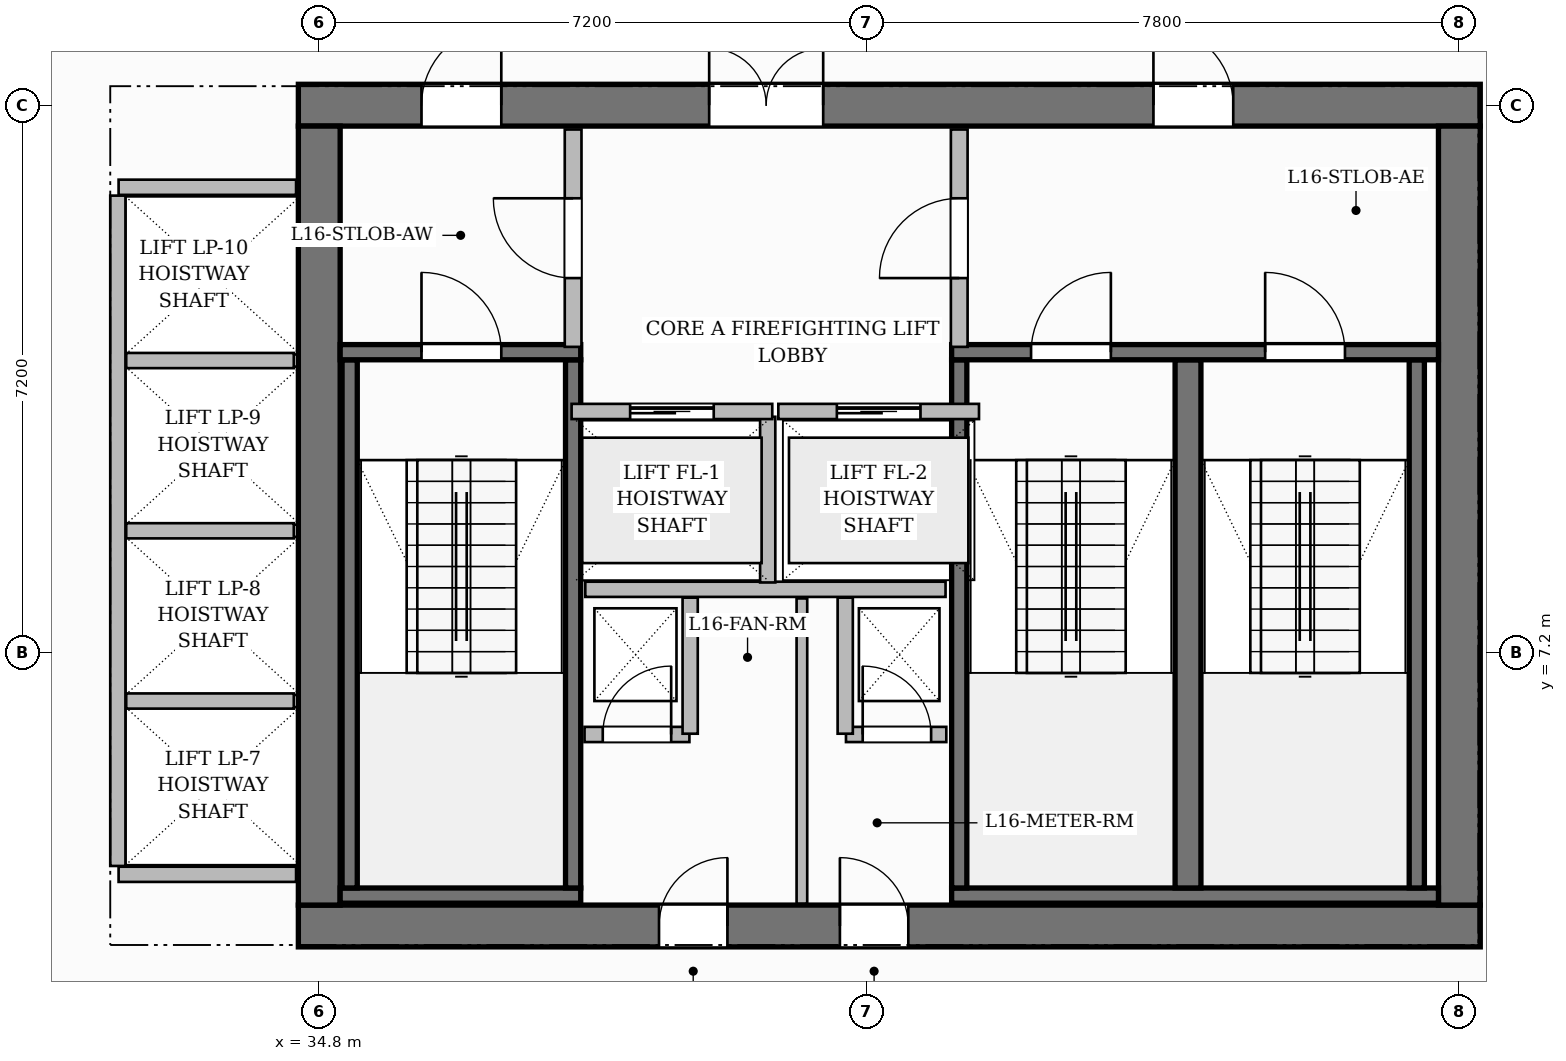
"""IFC4 building model, lengths in metres.
Left out: names, types, materials, properties, quantities, classifications, styles, units other than length and angle.
Written with IfcOpenShell. Run it as: python <this file> out.ifc"""

import sys

from ifc_helpers import new_model, si_unit, direction, frame, frame_2d, origin, place, context, subcontext, project, spatial, rectangle, extrude, source, transform, mapped, element, fill, save


model = new_model("IFC4")
c1 = context("Model", 3, precision=1e-05, world=origin(), true_north=direction((0.0, 1.0)))
c2 = subcontext(c1, "Body", "Model", "MODEL_VIEW")
j1 = project(units=[si_unit("LENGTHUNIT", "METRE"), si_unit("PLANEANGLEUNIT", "RADIAN")], contexts=[c1])
p1 = place(None, origin())
s1 = spatial("IfcSite", under=j1, at=p1, CompositionType="ELEMENT")
p2 = place(p1, origin())
s2 = spatial("IfcBuilding", under=s1, at=p2, CompositionType="ELEMENT")
p3 = place(p2, frame((0.0, 0.0, 69.4)))
s3 = spatial("IfcBuildingStorey", under=s2, at=p3, CompositionType="ELEMENT", Elevation=69.4)
p4 = place(p3, frame((34.525, 3.6, 0.0), z_axis=(0.0, 0.0, 1.0), x_axis=(1.0, 0.0, 0.0)))
e1 = element("IfcWall", 1, at=p4, inside=s3, PredefinedType="SHEAR", context=c2, shape_type="SweptSolid", body=[
    extrude(rectangle(XDim=15.55, YDim=0.55, at=frame_2d((7.775, 0.0))), origin(), (0.0, 0.0, 1.0), 3.7),
])
p5 = place(p4, frame((4.745, 0.0, 0.0)))
e2 = element("IfcOpeningElement", 2, at=p5, cuts=e1, PredefinedType="OPENING", context=c2, shape_type="SweptSolid", body=[
    extrude(rectangle(XDim=0.9, YDim=2.1, at=frame_2d((0.45, 1.05))), frame((0.0, 0.285, 0.0), z_axis=(0.0, -1.0, 0.0), x_axis=(1.0, 0.0, 0.0)), (0.0, 0.0, 1.0), 0.57),
])
p6 = place(p4, frame((7.125, 0.0, 0.0)))
e3 = element("IfcOpeningElement", 3, at=p6, cuts=e1, PredefinedType="OPENING", context=c2, shape_type="SweptSolid", body=[
    extrude(rectangle(XDim=0.9, YDim=2.1, at=frame_2d((0.45, 1.05))), frame((0.0, 0.285, 0.0), z_axis=(0.0, -1.0, 0.0), x_axis=(1.0, 0.0, 0.0)), (0.0, 0.0, 1.0), 0.57),
])
p7 = place(p3, frame((34.525, 14.4, 0.0), z_axis=(0.0, 0.0, 1.0), x_axis=(1.0, 0.0, 0.0)))
e4 = element("IfcWall", 4, at=p7, inside=s3, PredefinedType="SHEAR", context=c2, shape_type="SweptSolid", body=[
    extrude(rectangle(XDim=15.55, YDim=0.55, at=frame_2d((7.775, 0.0))), origin(), (0.0, 0.0, 1.0), 3.7),
])
p8 = place(p7, frame((5.405, 0.0, 0.0)))
e5 = element("IfcOpeningElement", 5, at=p8, cuts=e4, PredefinedType="OPENING", context=c2, shape_type="SweptSolid", body=[
    extrude(rectangle(XDim=1.5, YDim=2.2, at=frame_2d((0.75, 1.1))), frame((0.0, 0.285, 0.0), z_axis=(0.0, -1.0, 0.0), x_axis=(1.0, 0.0, 0.0)), (0.0, 0.0, 1.0), 0.57),
])
p9 = place(p7, frame((1.62, 0.0, 0.0)))
e6 = element("IfcOpeningElement", 6, at=p9, cuts=e4, PredefinedType="OPENING", context=c2, shape_type="SweptSolid", body=[
    extrude(rectangle(XDim=1.05, YDim=2.15, at=frame_2d((0.525, 1.075))), frame((0.0, 0.285, 0.0), z_axis=(0.0, -1.0, 0.0), x_axis=(1.0, 0.0, 0.0)), (0.0, 0.0, 1.0), 0.57),
])
p10 = place(p7, frame((11.25, 0.0, 0.0)))
e7 = element("IfcOpeningElement", 7, at=p10, cuts=e4, PredefinedType="OPENING", context=c2, shape_type="SweptSolid", body=[
    extrude(rectangle(XDim=1.05, YDim=2.15, at=frame_2d((0.525, 1.075))), frame((0.0, 0.285, 0.0), z_axis=(0.0, -1.0, 0.0), x_axis=(1.0, 0.0, 0.0)), (0.0, 0.0, 1.0), 0.57),
])
for number, where, z_axis, x_axis in (
    (8, (34.8, 3.875, 0.0), (0.0, 0.0, 1.0), (0.0, 1.0, 0.0)),
    (9, (49.8, 3.875, 0.0), (0.0, 0.0, 1.0), (0.0, 1.0, 0.0)),
):
    element("IfcWall", number, at=place(p3, frame(where, z_axis=z_axis, x_axis=x_axis)), inside=s3, PredefinedType="SHEAR", context=c2, shape_type="SweptSolid", body=[
        extrude(rectangle(XDim=10.25, YDim=0.55, at=frame_2d((5.125, 0.0))), origin(), (0.0, 0.0, 1.0), 3.7),
    ])
p11 = place(p3, frame((35.075, 4.0, 0.0), z_axis=(0.0, 0.0, 1.0), x_axis=(1.0, 0.0, 0.0)))
e10 = element("IfcWall", 10, at=p11, inside=s3, PredefinedType="SHEAR", context=c2, shape_type="SweptSolid", body=[
    extrude(rectangle(XDim=3.165, YDim=0.2, at=frame_2d((1.583, 0.0))), origin(), (0.0, 0.0, 1.0), 3.7),
])
for number, where, z_axis, x_axis in (
    (11, (35.2, 4.1, 0.0), (0.0, 0.0, 1.0), (0.0, 1.0, 0.0)),
    (12, (38.14, 4.1, 0.0), (0.0, 0.0, 1.0), (0.0, 1.0, 0.0)),
):
    element("IfcWall", number, at=place(p3, frame(where, z_axis=z_axis, x_axis=x_axis)), inside=s3, PredefinedType="SHEAR", context=c2, shape_type="SweptSolid", body=[
        extrude(rectangle(XDim=6.95, YDim=0.2, at=frame_2d((3.475, 0.0))), origin(), (0.0, 0.0, 1.0), 3.7),
    ])
p12 = place(p3, frame((35.075, 11.15, 0.0), z_axis=(0.0, 0.0, 1.0), x_axis=(1.0, 0.0, 0.0)))
e13 = element("IfcWall", 13, at=p12, inside=s3, PredefinedType="SHEAR", context=c2, shape_type="SweptSolid", body=[
    extrude(rectangle(XDim=3.165, YDim=0.2, at=frame_2d((1.583, 0.0))), origin(), (0.0, 0.0, 1.0), 3.7),
])
p13 = place(p12, frame((1.07, 0.0, 0.0)))
e14 = element("IfcOpeningElement", 14, at=p13, cuts=e13, PredefinedType="OPENING", context=c2, shape_type="SweptSolid", body=[
    extrude(rectangle(XDim=1.05, YDim=2.2, at=frame_2d((0.525, 1.1))), frame((0.0, 0.11, 0.0), z_axis=(0.0, -1.0, 0.0), x_axis=(1.0, 0.0, 0.0)), (0.0, 0.0, 1.0), 0.22),
])
p14 = place(p3, frame((43.12, 4.0, 0.0), z_axis=(0.0, 0.0, 1.0), x_axis=(1.0, 0.0, 0.0)))
e15 = element("IfcWall", 15, at=p14, inside=s3, PredefinedType="SHEAR", context=c2, shape_type="SweptSolid", body=[
    extrude(rectangle(XDim=6.405, YDim=0.2, at=frame_2d((3.202, 0.0))), origin(), (0.0, 0.0, 1.0), 3.7),
])
p15 = place(p3, frame((43.22, 4.1, 0.0), z_axis=(0.0, 0.0, 1.0), x_axis=(0.0, 1.0, 0.0)))
e16 = element("IfcWall", 16, at=p15, inside=s3, PredefinedType="SHEAR", context=c2, shape_type="SweptSolid", body=[
    extrude(rectangle(XDim=6.95, YDim=0.2, at=frame_2d((3.475, 0.0))), origin(), (0.0, 0.0, 1.0), 3.7),
])
p16 = place(p3, frame((46.23, 4.1, 0.0), z_axis=(0.0, 0.0, 1.0), x_axis=(0.0, 1.0, 0.0)))
e17 = element("IfcWall", 17, at=p16, inside=s3, PredefinedType="SHEAR", context=c2, shape_type="SweptSolid", body=[
    extrude(rectangle(XDim=6.95, YDim=0.34, at=frame_2d((3.475, 0.0))), origin(), (0.0, 0.0, 1.0), 3.7),
])
p17 = place(p3, frame((49.24, 4.1, 0.0), z_axis=(0.0, 0.0, 1.0), x_axis=(0.0, 1.0, 0.0)))
e18 = element("IfcWall", 18, at=p17, inside=s3, PredefinedType="SHEAR", context=c2, shape_type="SweptSolid", body=[
    extrude(rectangle(XDim=6.95, YDim=0.2, at=frame_2d((3.475, 0.0))), origin(), (0.0, 0.0, 1.0), 3.7),
])
p18 = place(p3, frame((43.12, 11.15, 0.0), z_axis=(0.0, 0.0, 1.0), x_axis=(1.0, 0.0, 0.0)))
e19 = element("IfcWall", 19, at=p18, inside=s3, PredefinedType="SHEAR", context=c2, shape_type="SweptSolid", body=[
    extrude(rectangle(XDim=6.405, YDim=0.2, at=frame_2d((3.202, 0.0))), origin(), (0.0, 0.0, 1.0), 3.7),
])
p19 = place(p18, frame((1.045, 0.0, 0.0)))
e20 = element("IfcOpeningElement", 20, at=p19, cuts=e19, PredefinedType="OPENING", context=c2, shape_type="SweptSolid", body=[
    extrude(rectangle(XDim=1.05, YDim=2.2, at=frame_2d((0.525, 1.1))), frame((0.0, 0.11, 0.0), z_axis=(0.0, -1.0, 0.0), x_axis=(1.0, 0.0, 0.0)), (0.0, 0.0, 1.0), 0.22),
])
p20 = place(p18, frame((4.125, 0.0, 0.0)))
e21 = element("IfcOpeningElement", 21, at=p20, cuts=e19, PredefinedType="OPENING", context=c2, shape_type="SweptSolid", body=[
    extrude(rectangle(XDim=1.05, YDim=2.2, at=frame_2d((0.525, 1.1))), frame((0.0, 0.11, 0.0), z_axis=(0.0, -1.0, 0.0), x_axis=(1.0, 0.0, 0.0)), (0.0, 0.0, 1.0), 0.22),
])
p21 = place(p3, frame((38.3, 8.03, 0.0), z_axis=(0.0, 0.0, 1.0), x_axis=(1.0, 0.0, 0.0)))
e22 = element("IfcWall", 22, at=p21, inside=s3, PredefinedType="PARTITIONING", context=c2, shape_type="SweptSolid", body=[
    extrude(rectangle(XDim=4.74, YDim=0.2, at=frame_2d((2.37, 0.0))), origin(), (0.0, 0.0, 1.0), 3.45),
])
p22 = place(p3, frame((40.7, 8.12, 0.0), z_axis=(0.0, 0.0, 1.0), x_axis=(0.0, 1.0, 0.0)))
e23 = element("IfcWall", 23, at=p22, inside=s3, PredefinedType="PARTITIONING", context=c2, shape_type="SweptSolid", body=[
    extrude(rectangle(XDim=2.18, YDim=0.2, at=frame_2d((1.09, 0.0))), origin(), (0.0, 0.0, 1.0), 3.45),
])
p23 = place(p3, frame((38.14, 11.22, 0.0), z_axis=(0.0, 0.0, 1.0), x_axis=(0.0, 1.0, 0.0)))
e24 = element("IfcWall", 24, at=p23, inside=s3, PredefinedType="PARTITIONING", context=c2, shape_type="SweptSolid", body=[
    extrude(rectangle(XDim=2.86, YDim=0.22, at=frame_2d((1.43, 0.0))), origin(), (0.0, 0.0, 1.0), 3.45),
])
p24 = place(p23, frame((0.905, 0.0, 0.0)))
e25 = element("IfcOpeningElement", 25, at=p24, cuts=e24, PredefinedType="OPENING", context=c2, shape_type="SweptSolid", body=[
    extrude(rectangle(XDim=1.05, YDim=2.15, at=frame_2d((0.525, 1.075))), frame((0.0, 0.12, 0.0), z_axis=(0.0, -1.0, 0.0), x_axis=(1.0, 0.0, 0.0)), (0.0, 0.0, 1.0), 0.24),
])
p25 = place(p3, frame((43.22, 11.22, 0.0), z_axis=(0.0, 0.0, 1.0), x_axis=(0.0, 1.0, 0.0)))
e26 = element("IfcWall", 26, at=p25, inside=s3, PredefinedType="PARTITIONING", context=c2, shape_type="SweptSolid", body=[
    extrude(rectangle(XDim=2.86, YDim=0.22, at=frame_2d((1.43, 0.0))), origin(), (0.0, 0.0, 1.0), 3.45),
])
p26 = place(p25, frame((0.905, 0.0, 0.0)))
e27 = element("IfcOpeningElement", 27, at=p26, cuts=e26, PredefinedType="OPENING", context=c2, shape_type="SweptSolid", body=[
    extrude(rectangle(XDim=1.05, YDim=2.15, at=frame_2d((0.525, 1.075))), frame((0.0, 0.12, 0.0), z_axis=(0.0, -1.0, 0.0), x_axis=(1.0, 0.0, 0.0)), (0.0, 0.0, 1.0), 0.24),
])
p27 = place(p3, frame((38.29, 6.12, 0.0), z_axis=(0.0, 0.0, 1.0), x_axis=(1.0, 0.0, 0.0)))
e28 = element("IfcWall", 28, at=p27, inside=s3, PredefinedType="PARTITIONING", context=c2, shape_type="SweptSolid", body=[
    extrude(rectangle(XDim=1.38, YDim=0.2, at=frame_2d((0.69, 0.0))), origin(), (0.0, 0.0, 1.0), 3.45),
])
p28 = place(p27, frame((0.24, 0.0, 0.0)))
e29 = element("IfcOpeningElement", 29, at=p28, cuts=e28, PredefinedType="OPENING", context=c2, shape_type="SweptSolid", body=[
    extrude(rectangle(XDim=0.9, YDim=2.1, at=frame_2d((0.45, 1.05))), frame((0.0, 0.11, 0.0), z_axis=(0.0, -1.0, 0.0), x_axis=(1.0, 0.0, 0.0)), (0.0, 0.0, 1.0), 0.22),
])
p29 = place(p3, frame((39.68, 6.13, 0.0), z_axis=(0.0, 0.0, 1.0), x_axis=(0.0, 1.0, 0.0)))
e30 = element("IfcWall", 30, at=p29, inside=s3, PredefinedType="PARTITIONING", context=c2, shape_type="SweptSolid", body=[
    extrude(rectangle(XDim=1.79, YDim=0.2, at=frame_2d((0.895, 0.0))), origin(), (0.0, 0.0, 1.0), 3.45),
])
p30 = place(p3, frame((41.73, 6.12, 0.0), z_axis=(0.0, 0.0, 1.0), x_axis=(1.0, 0.0, 0.0)))
e31 = element("IfcWall", 31, at=p30, inside=s3, PredefinedType="PARTITIONING", context=c2, shape_type="SweptSolid", body=[
    extrude(rectangle(XDim=1.32, YDim=0.2, at=frame_2d((0.66, 0.0))), origin(), (0.0, 0.0, 1.0), 3.45),
])
p31 = place(p30, frame((0.22, 0.0, 0.0)))
e32 = element("IfcOpeningElement", 32, at=p31, cuts=e31, PredefinedType="OPENING", context=c2, shape_type="SweptSolid", body=[
    extrude(rectangle(XDim=0.9, YDim=2.1, at=frame_2d((0.45, 1.05))), frame((0.0, 0.11, 0.0), z_axis=(0.0, -1.0, 0.0), x_axis=(1.0, 0.0, 0.0)), (0.0, 0.0, 1.0), 0.22),
])
p32 = place(p3, frame((41.72, 6.13, 0.0), z_axis=(0.0, 0.0, 1.0), x_axis=(0.0, 1.0, 0.0)))
e33 = element("IfcWall", 33, at=p32, inside=s3, PredefinedType="PARTITIONING", context=c2, shape_type="SweptSolid", body=[
    extrude(rectangle(XDim=1.79, YDim=0.2, at=frame_2d((0.895, 0.0))), origin(), (0.0, 0.0, 1.0), 3.45),
])
p33 = place(p3, frame((41.15, 3.895, 0.0), z_axis=(0.0, 0.0, 1.0), x_axis=(0.0, 1.0, 0.0)))
e34 = element("IfcWall", 34, at=p33, inside=s3, PredefinedType="PARTITIONING", context=c2, shape_type="SweptSolid", body=[
    extrude(rectangle(XDim=4.015, YDim=0.14, at=frame_2d((2.007, 0.0))), origin(), (0.0, 0.0, 1.0), 3.45),
])
for number, where, z_axis, x_axis in (
    (35, (32.16, 4.28, 0.0), (0.0, 0.0, 1.0), (1.0, 0.0, 0.0)),
    (36, (32.16, 13.32, 0.0), (0.0, 0.0, 1.0), (1.0, 0.0, 0.0)),
):
    element("IfcWall", number, at=place(p3, frame(where, z_axis=z_axis, x_axis=x_axis)), inside=s3, PredefinedType="PARTITIONING", context=c2, shape_type="SweptSolid", body=[
        extrude(rectangle(XDim=2.335, YDim=0.2, at=frame_2d((1.167, 0.0))), origin(), (0.0, 0.0, 1.0), 3.45),
    ])
p34 = place(p3, frame((32.15, 4.39, 0.0), z_axis=(0.0, 0.0, 1.0), x_axis=(0.0, 1.0, 0.0)))
e37 = element("IfcWall", 37, at=p34, inside=s3, PredefinedType="PARTITIONING", context=c2, shape_type="SweptSolid", body=[
    extrude(rectangle(XDim=8.82, YDim=0.2, at=frame_2d((4.41, 0.0))), origin(), (0.0, 0.0, 1.0), 3.45),
])
for number, where, z_axis, x_axis in (
    (38, (32.26, 6.56, 0.0), (0.0, 0.0, 1.0), (1.0, 0.0, 0.0)),
    (39, (32.26, 8.8, 0.0), (0.0, 0.0, 1.0), (1.0, 0.0, 0.0)),
    (40, (32.26, 11.04, 0.0), (0.0, 0.0, 1.0), (1.0, 0.0, 0.0)),
):
    element("IfcWall", number, at=place(p3, frame(where, z_axis=z_axis, x_axis=x_axis)), inside=s3, PredefinedType="PARTITIONING", context=c2, shape_type="SweptSolid", body=[
        extrude(rectangle(XDim=2.205, YDim=0.2, at=frame_2d((1.103, 0.0))), origin(), (0.0, 0.0, 1.0), 3.45),
    ])
p35 = place(p3, frame((38.12, 10.37, 0.0), z_axis=(0.0, 0.0, 1.0), x_axis=(1.0, 0.0, 0.0)))
e41 = element("IfcWall", 41, at=p35, inside=s3, PredefinedType="PARTITIONING", context=c2, shape_type="SweptSolid", body=[
    extrude(rectangle(XDim=2.64, YDim=0.2, at=frame_2d((1.32, 0.0))), origin(), (0.0, 0.0, 1.0), 3.45),
])
p36 = place(p35, frame((0.77, 0.0, 0.0)))
e42 = element("IfcOpeningElement", 42, at=p36, cuts=e41, PredefinedType="OPENING", context=c2, shape_type="SweptSolid", body=[
    extrude(rectangle(XDim=1.1, YDim=2.2, at=frame_2d((0.55, 1.1))), frame((0.0, 0.11, 0.0), z_axis=(0.0, -1.0, 0.0), x_axis=(1.0, 0.0, 0.0)), (0.0, 0.0, 1.0), 0.22),
])
p37 = place(p3, frame((40.84, 10.37, 0.0), z_axis=(0.0, 0.0, 1.0), x_axis=(1.0, 0.0, 0.0)))
e43 = element("IfcWall", 43, at=p37, inside=s3, PredefinedType="PARTITIONING", context=c2, shape_type="SweptSolid", body=[
    extrude(rectangle(XDim=2.64, YDim=0.2, at=frame_2d((1.32, 0.0))), origin(), (0.0, 0.0, 1.0), 3.45),
])
p38 = place(p37, frame((0.77, 0.0, 0.0)))
e44 = element("IfcOpeningElement", 44, at=p38, cuts=e43, PredefinedType="OPENING", context=c2, shape_type="SweptSolid", body=[
    extrude(rectangle(XDim=1.1, YDim=2.2, at=frame_2d((0.55, 1.1))), frame((0.0, 0.11, 0.0), z_axis=(0.0, -1.0, 0.0), x_axis=(1.0, 0.0, 0.0)), (0.0, 0.0, 1.0), 0.22),
])
m1 = source(origin(), c2, "Body", "SweptSolid", [
    extrude(rectangle(XDim=1.05, YDim=2.2, at=frame_2d((0.525, 1.1))), frame((0.0, 0.025, 0.0), z_axis=(0.0, -1.0, 0.0), x_axis=(1.0, 0.0, 0.0)), (0.0, 0.0, 1.0), 0.05),
])
p39 = place(p13, origin())
e45 = element("IfcDoor", 45, at=p39, inside=s3, OperationType="SINGLE_SWING_LEFT", PredefinedType="DOOR", context=c2, shape_type="MappedRepresentation", body=[
    mapped(m1, transform((0.0, 0.0, 0.0), scale=1.0)),
])
fill(e14, e45)
p40 = place(p19, origin())
e46 = element("IfcDoor", 46, at=p40, inside=s3, OperationType="SINGLE_SWING_RIGHT", PredefinedType="DOOR", context=c2, shape_type="MappedRepresentation", body=[
    mapped(m1, transform((0.0, 0.0, 0.0), scale=1.0)),
])
fill(e20, e46)
p41 = place(p20, origin())
e47 = element("IfcDoor", 47, at=p41, inside=s3, OperationType="SINGLE_SWING_LEFT", PredefinedType="DOOR", context=c2, shape_type="MappedRepresentation", body=[
    mapped(m1, transform((0.0, 0.0, 0.0), scale=1.0)),
])
fill(e21, e47)
m2 = source(origin(), c2, "Body", "SweptSolid", [
    extrude(rectangle(XDim=1.05, YDim=2.15, at=frame_2d((0.525, 1.075))), frame((0.0, 0.025, 0.0), z_axis=(0.0, -1.0, 0.0), x_axis=(1.0, 0.0, 0.0)), (0.0, 0.0, 1.0), 0.05),
])
p42 = place(p24, origin())
e48 = element("IfcDoor", 48, at=p42, inside=s3, OperationType="SINGLE_SWING_RIGHT", PredefinedType="DOOR", context=c2, shape_type="MappedRepresentation", body=[
    mapped(m2, transform((0.0, 0.0, 0.0), scale=1.0)),
])
fill(e25, e48)
p43 = place(p26, origin())
e49 = element("IfcDoor", 49, at=p43, inside=s3, OperationType="SINGLE_SWING_LEFT", PredefinedType="DOOR", context=c2, shape_type="MappedRepresentation", body=[
    mapped(m2, transform((0.0, 0.0, 0.0), scale=1.0)),
])
fill(e27, e49)
m3 = source(origin(), c2, "Body", "SweptSolid", [
    extrude(rectangle(XDim=1.5, YDim=2.2, at=frame_2d((0.75, 1.1))), frame((0.0, 0.025, 0.0), z_axis=(0.0, -1.0, 0.0), x_axis=(1.0, 0.0, 0.0)), (0.0, 0.0, 1.0), 0.05),
])
p44 = place(p8, origin())
e50 = element("IfcDoor", 50, at=p44, inside=s3, OperationType="DOUBLE_DOOR_SINGLE_SWING", PredefinedType="DOOR", context=c2, shape_type="MappedRepresentation", body=[
    mapped(m3, transform((0.0, 0.0, 0.0), scale=1.0)),
])
fill(e5, e50)
p45 = place(p9, origin())
e51 = element("IfcDoor", 51, at=p45, inside=s3, OperationType="SINGLE_SWING_RIGHT", PredefinedType="DOOR", context=c2, shape_type="MappedRepresentation", body=[
    mapped(m2, transform((0.0, 0.0, 0.0), scale=1.0)),
])
fill(e6, e51)
p46 = place(p10, origin())
e52 = element("IfcDoor", 52, at=p46, inside=s3, OperationType="SINGLE_SWING_LEFT", PredefinedType="DOOR", context=c2, shape_type="MappedRepresentation", body=[
    mapped(m2, transform((0.0, 0.0, 0.0), scale=1.0)),
])
fill(e7, e52)
m4 = source(origin(), c2, "Body", "SweptSolid", [
    extrude(rectangle(XDim=0.9, YDim=2.1, at=frame_2d((0.45, 1.05))), frame((0.0, 0.025, 0.0), z_axis=(0.0, -1.0, 0.0), x_axis=(1.0, 0.0, 0.0)), (0.0, 0.0, 1.0), 0.05),
])
p47 = place(p28, origin())
e53 = element("IfcDoor", 53, at=p47, inside=s3, OperationType="SINGLE_SWING_RIGHT", PredefinedType="DOOR", context=c2, shape_type="MappedRepresentation", body=[
    mapped(m4, transform((0.0, 0.0, 0.0), scale=1.0)),
])
fill(e29, e53)
p48 = place(p31, origin())
e54 = element("IfcDoor", 54, at=p48, inside=s3, OperationType="SINGLE_SWING_LEFT", PredefinedType="DOOR", context=c2, shape_type="MappedRepresentation", body=[
    mapped(m4, transform((0.0, 0.0, 0.0), scale=1.0)),
])
fill(e32, e54)
p49 = place(p5, origin())
e55 = element("IfcDoor", 55, at=p49, inside=s3, OperationType="SINGLE_SWING_RIGHT", PredefinedType="DOOR", context=c2, shape_type="MappedRepresentation", body=[
    mapped(m4, transform((0.0, 0.0, 0.0), scale=1.0)),
])
fill(e2, e55)
p50 = place(p6, origin())
e56 = element("IfcDoor", 56, at=p50, inside=s3, OperationType="SINGLE_SWING_LEFT", PredefinedType="DOOR", context=c2, shape_type="MappedRepresentation", body=[
    mapped(m4, transform((0.0, 0.0, 0.0), scale=1.0)),
])
fill(e3, e56)
m5 = source(origin(), c2, "Body", "SweptSolid", [
    extrude(rectangle(XDim=1.1, YDim=2.2, at=frame_2d((0.55, 1.1))), frame((0.0, 0.025, 0.0), z_axis=(0.0, -1.0, 0.0), x_axis=(1.0, 0.0, 0.0)), (0.0, 0.0, 1.0), 0.05),
])
p51 = place(p36, origin())
e57 = element("IfcDoor", 57, at=p51, inside=s3, OperationType="SLIDING_TO_LEFT", PredefinedType="DOOR", context=c2, shape_type="MappedRepresentation", body=[
    mapped(m5, transform((0.0, 0.0, 0.0), scale=1.0)),
])
fill(e42, e57)
p52 = place(p38, origin())
e58 = element("IfcDoor", 58, at=p52, inside=s3, OperationType="SLIDING_TO_LEFT", PredefinedType="DOOR", context=c2, shape_type="MappedRepresentation", body=[
    mapped(m5, transform((0.0, 0.0, 0.0), scale=1.0)),
])
fill(e44, e58)
save(model, sys.argv[1])
